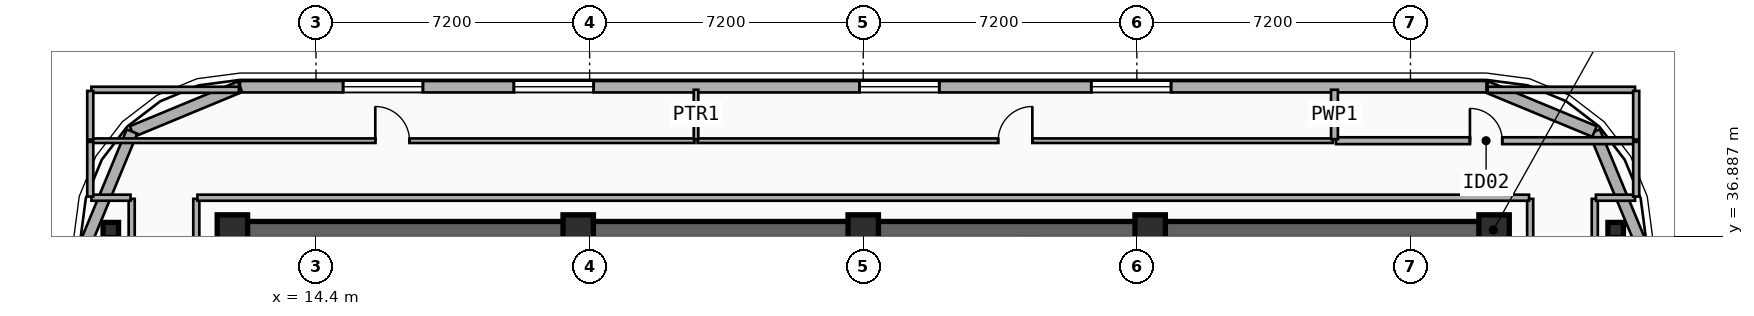
"""IFC4 building model, lengths in metres.
Left out: names, types, materials, properties, quantities, classifications, styles, units other than length and angle.
Written with IfcOpenShell. Run it as: python <this file> out.ifc"""

import sys

from ifc_helpers import new_model, si_unit, direction, frame, frame_2d, origin, origin_2d, place, context, subcontext, project, spatial, rectangle, i_section, extrude, element, fill, save


model = new_model("IFC4")
c1 = context("Model", 3, precision=1e-05, world=origin(), true_north=direction((0.0, 1.0)))
c2 = subcontext(c1, "Body", "Model", "MODEL_VIEW")
j1 = project(units=[si_unit("LENGTHUNIT", "METRE"), si_unit("PLANEANGLEUNIT", "RADIAN")], contexts=[c1])
p1 = place(None, origin())
s1 = spatial("IfcSite", under=j1, at=p1, CompositionType="ELEMENT")
p2 = place(p1, origin())
s2 = spatial("IfcBuilding", under=s1, at=p2, CompositionType="ELEMENT")
p3 = place(p2, frame((0.0, 0.0, 265.8)))
s3 = spatial("IfcBuildingStorey", under=s2, at=p3, CompositionType="ELEMENT", Elevation=265.8)
p4 = place(p3, frame((12.15, 37.05, 0.0), z_axis=(0.0, 0.0, 1.0), x_axis=(1.0, 0.0, 0.0)))
e1 = element("IfcWall", 1, at=p4, inside=s3, PredefinedType="SHEAR", context=c2, shape_type="SweptSolid", body=[
    extrude(rectangle(XDim=33.23, YDim=0.45, at=frame_2d((16.615, 0.0))), origin(), (0.0, 0.0, 1.0), 3.7),
])
for number, where, z_axis, x_axis in (
    (2, (12.2, 37.05, 0.0), (0.0, 0.0, 1.0), (1.0, 0.0, 0.0)),
    (3, (21.3, 37.05, 0.0), (0.0, 0.0, 1.0), (1.0, 0.0, 0.0)),
    (4, (28.8, 37.05, 0.0), (0.0, 0.0, 1.0), (1.0, 0.0, 0.0)),
    (5, (36.35, 37.05, 0.0), (0.0, 0.0, 1.0), (1.0, 0.0, 0.0)),
    (6, (45.4, 37.05, 0.0), (0.0, 0.0, 1.0), (1.0, 0.0, 0.0)),
):
    element("IfcColumn", number, at=place(p3, frame(where, z_axis=z_axis, x_axis=x_axis)), inside=s3, PredefinedType="COLUMN", context=c2, shape_type="SweptSolid", body=[
        extrude(rectangle(XDim=0.8, YDim=0.8, at=origin_2d()), origin(), (0.0, 0.0, 1.0), 3.7),
    ])
for number, where, z_axis, x_axis in (
    (7, (9.0, 37.05, 0.0), (0.0, 0.0, 1.0), (1.0, 0.0, 0.0)),
    (8, (48.6, 37.05, 0.0), (0.0, 0.0, 1.0), (1.0, 0.0, 0.0)),
):
    element("IfcColumn", number, at=place(p3, frame(where, z_axis=z_axis, x_axis=x_axis)), inside=s3, PredefinedType="COLUMN", context=c2, shape_type="SweptSolid", body=[
        extrude(i_section(OverallWidth=0.408, OverallDepth=0.4, WebThickness=0.025, FlangeThickness=0.039, FilletRadius=0.015, at=origin_2d()), origin(), (0.0, 0.0, 1.0), 3.7),
    ])
for number, where, z_axis, x_axis in (
    (9, (48.042, 39.643, 0.0), (0.0, 0.0, 1.0), (0.383, -0.924, 0.0)),
    (10, (45.2, 40.82, 0.0), (0.0, 0.0, 1.0), (0.924, -0.383, 0.0)),
):
    element("IfcWall", number, at=place(p3, frame(where, z_axis=z_axis, x_axis=x_axis)), inside=s3, PredefinedType="SOLIDWALL", context=c2, shape_type="SweptSolid", body=[
        extrude(rectangle(XDim=3.077, YDim=0.3, at=frame_2d((1.538, 0.0))), origin(), (0.0, 0.0, 1.0), 3.42),
    ])
p5 = place(p3, frame((12.4, 40.82, 0.0), z_axis=(0.0, 0.0, 1.0), x_axis=(1.0, 0.0, 0.0)))
e11 = element("IfcWall", 11, at=p5, inside=s3, PredefinedType="SOLIDWALL", context=c2, shape_type="SweptSolid", body=[
    extrude(rectangle(XDim=32.8, YDim=0.3, at=frame_2d((16.4, 0.0))), origin(), (0.0, 0.0, 1.0), 3.42),
])
p6 = place(p5, frame((2.713, 0.0, 0.75)))
e12 = element("IfcOpeningElement", 12, at=p6, cuts=e11, PredefinedType="OPENING", context=c2, shape_type="SweptSolid", body=[
    extrude(rectangle(XDim=2.1, YDim=2.1, at=frame_2d((1.05, 1.05))), frame((0.0, 0.16, 0.0), z_axis=(0.0, -1.0, 0.0), x_axis=(1.0, 0.0, 0.0)), (0.0, 0.0, 1.0), 0.32),
])
p7 = place(p5, frame((7.207, 0.0, 0.75)))
e13 = element("IfcOpeningElement", 13, at=p7, cuts=e11, PredefinedType="OPENING", context=c2, shape_type="SweptSolid", body=[
    extrude(rectangle(XDim=2.1, YDim=2.1, at=frame_2d((1.05, 1.05))), frame((0.0, 0.16, 0.0), z_axis=(0.0, -1.0, 0.0), x_axis=(1.0, 0.0, 0.0)), (0.0, 0.0, 1.0), 0.32),
])
p8 = place(p5, frame((16.3, 0.0, 0.75)))
e14 = element("IfcOpeningElement", 14, at=p8, cuts=e11, PredefinedType="OPENING", context=c2, shape_type="SweptSolid", body=[
    extrude(rectangle(XDim=2.1, YDim=2.1, at=frame_2d((1.05, 1.05))), frame((0.0, 0.16, 0.0), z_axis=(0.0, -1.0, 0.0), x_axis=(1.0, 0.0, 0.0)), (0.0, 0.0, 1.0), 0.32),
])
p9 = place(p5, frame((22.4, 0.0, 0.75)))
e15 = element("IfcOpeningElement", 15, at=p9, cuts=e11, PredefinedType="OPENING", context=c2, shape_type="SweptSolid", body=[
    extrude(rectangle(XDim=2.1, YDim=2.1, at=frame_2d((1.05, 1.05))), frame((0.0, 0.16, 0.0), z_axis=(0.0, -1.0, 0.0), x_axis=(1.0, 0.0, 0.0)), (0.0, 0.0, 1.0), 0.32),
])
for number, where, z_axis, x_axis in (
    (16, (9.557, 39.643, 0.0), (0.0, 0.0, 1.0), (0.924, 0.383, 0.0)),
    (17, (8.38, 36.8, 0.0), (0.0, 0.0, 1.0), (0.383, 0.924, 0.0)),
):
    element("IfcWall", number, at=place(p3, frame(where, z_axis=z_axis, x_axis=x_axis)), inside=s3, PredefinedType="SOLIDWALL", context=c2, shape_type="SweptSolid", body=[
        extrude(rectangle(XDim=3.077, YDim=0.3, at=frame_2d((1.538, 0.0))), origin(), (0.0, 0.0, 1.0), 3.42),
    ])
p10 = place(p3, frame((8.46, 39.4, 0.0), z_axis=(0.0, 0.0, 1.0), x_axis=(1.0, 0.0, 0.0)))
e18 = element("IfcWall", 18, at=p10, inside=s3, PredefinedType="PARTITIONING", context=c2, shape_type="SweptSolid", body=[
    extrude(rectangle(XDim=15.9, YDim=0.12, at=frame_2d((7.95, 0.0))), origin(), (0.0, 0.0, 1.0), 3.42),
])
p11 = place(p10, frame((7.5, 0.0, 0.0)))
e19 = element("IfcOpeningElement", 19, at=p11, cuts=e18, PredefinedType="OPENING", context=c2, shape_type="SweptSolid", body=[
    extrude(rectangle(XDim=0.9, YDim=2.1, at=frame_2d((0.45, 1.05))), frame((0.0, 0.07, 0.0), z_axis=(0.0, -1.0, 0.0), x_axis=(1.0, 0.0, 0.0)), (0.0, 0.0, 1.0), 0.14),
])
p12 = place(p3, frame((24.44, 39.4, 0.0), z_axis=(0.0, 0.0, 1.0), x_axis=(1.0, 0.0, 0.0)))
e20 = element("IfcWall", 20, at=p12, inside=s3, PredefinedType="PARTITIONING", context=c2, shape_type="SweptSolid", body=[
    extrude(rectangle(XDim=16.72, YDim=0.12, at=frame_2d((8.36, 0.0))), origin(), (0.0, 0.0, 1.0), 3.42),
])
p13 = place(p12, frame((7.91, 0.0, 0.0)))
e21 = element("IfcOpeningElement", 21, at=p13, cuts=e20, PredefinedType="OPENING", context=c2, shape_type="SweptSolid", body=[
    extrude(rectangle(XDim=0.9, YDim=2.1, at=frame_2d((0.45, 1.05))), frame((0.0, 0.07, 0.0), z_axis=(0.0, -1.0, 0.0), x_axis=(1.0, 0.0, 0.0)), (0.0, 0.0, 1.0), 0.14),
])
p14 = place(p3, frame((41.24, 39.4, 0.0), z_axis=(0.0, 0.0, 1.0), x_axis=(1.0, 0.0, 0.0)))
e22 = element("IfcWall", 22, at=p14, inside=s3, PredefinedType="PLUMBINGWALL", context=c2, shape_type="SweptSolid", body=[
    extrude(rectangle(XDim=7.9, YDim=0.18, at=frame_2d((3.95, 0.0))), origin(), (0.0, 0.0, 1.0), 3.42),
])
p15 = place(p14, frame((3.525, 0.0, 0.0)))
e23 = element("IfcOpeningElement", 23, at=p15, cuts=e22, PredefinedType="OPENING", context=c2, shape_type="SweptSolid", body=[
    extrude(rectangle(XDim=0.85, YDim=2.1, at=frame_2d((0.425, 1.05))), frame((0.0, 0.1, 0.0), z_axis=(0.0, -1.0, 0.0), x_axis=(1.0, 0.0, 0.0)), (0.0, 0.0, 1.0), 0.2),
])
p16 = place(p3, frame((24.4, 39.44, 0.0), z_axis=(0.0, 0.0, 1.0), x_axis=(0.0, 1.0, 0.0)))
e24 = element("IfcWall", 24, at=p16, inside=s3, PredefinedType="PARTITIONING", context=c2, shape_type="SweptSolid", body=[
    extrude(rectangle(XDim=1.3, YDim=0.12, at=frame_2d((0.65, 0.0))), origin(), (0.0, 0.0, 1.0), 3.42),
])
p17 = place(p3, frame((41.2, 39.44, 0.0), z_axis=(0.0, 0.0, 1.0), x_axis=(0.0, 1.0, 0.0)))
e25 = element("IfcWall", 25, at=p17, inside=s3, PredefinedType="PLUMBINGWALL", context=c2, shape_type="SweptSolid", body=[
    extrude(rectangle(XDim=1.3, YDim=0.18, at=frame_2d((0.65, 0.0))), origin(), (0.0, 0.0, 1.0), 3.42),
])
for number, where, z_axis, x_axis in (
    (26, (9.55, 27.63, 0.0), (0.0, 0.0, 1.0), (0.0, 1.0, 0.0)),
    (27, (11.25, 27.63, 0.0), (0.0, 0.0, 1.0), (0.0, 1.0, 0.0)),
    (28, (46.35, 27.63, 0.0), (0.0, 0.0, 1.0), (0.0, 1.0, 0.0)),
    (29, (48.05, 27.63, 0.0), (0.0, 0.0, 1.0), (0.0, 1.0, 0.0)),
):
    element("IfcWall", number, at=place(p3, frame(where, z_axis=z_axis, x_axis=x_axis)), inside=s3, PredefinedType="PARTITIONING", context=c2, shape_type="SweptSolid", body=[
        extrude(rectangle(XDim=10.24, YDim=0.16, at=frame_2d((5.12, 0.0))), origin(), (0.0, 0.0, 1.0), 2.9),
    ])
p18 = place(p3, frame((8.49, 37.9, 0.0), z_axis=(0.0, 0.0, 1.0), x_axis=(1.0, 0.0, 0.0)))
e30 = element("IfcWall", 30, at=p18, inside=s3, PredefinedType="PARTITIONING", context=c2, shape_type="SweptSolid", body=[
    extrude(rectangle(XDim=1.03, YDim=0.16, at=frame_2d((0.515, 0.0))), origin(), (0.0, 0.0, 1.0), 3.42),
])
p19 = place(p3, frame((11.28, 37.9, 0.0), z_axis=(0.0, 0.0, 1.0), x_axis=(1.0, 0.0, 0.0)))
e31 = element("IfcWall", 31, at=p19, inside=s3, PredefinedType="PARTITIONING", context=c2, shape_type="SweptSolid", body=[
    extrude(rectangle(XDim=35.04, YDim=0.16, at=frame_2d((17.52, 0.0))), origin(), (0.0, 0.0, 1.0), 3.42),
])
p20 = place(p3, frame((48.08, 37.9, 0.0), z_axis=(0.0, 0.0, 1.0), x_axis=(1.0, 0.0, 0.0)))
e32 = element("IfcWall", 32, at=p20, inside=s3, PredefinedType="PARTITIONING", context=c2, shape_type="SweptSolid", body=[
    extrude(rectangle(XDim=1.03, YDim=0.16, at=frame_2d((0.515, 0.0))), origin(), (0.0, 0.0, 1.0), 3.42),
])
for number, where, z_axis, x_axis in (
    (33, (8.46, 37.93, 0.0), (0.0, 0.0, 1.0), (0.0, 1.0, 0.0)),
    (34, (49.14, 37.93, 0.0), (0.0, 0.0, 1.0), (0.0, 1.0, 0.0)),
):
    element("IfcWall", number, at=place(p3, frame(where, z_axis=z_axis, x_axis=x_axis)), inside=s3, PredefinedType="PARTITIONING", context=c2, shape_type="SweptSolid", body=[
        extrude(rectangle(XDim=1.44, YDim=0.16, at=frame_2d((0.72, 0.0))), origin(), (0.0, 0.0, 1.0), 3.42),
    ])
p21 = place(p3, frame((8.49, 40.74, 0.0), z_axis=(0.0, 0.0, 1.0), x_axis=(1.0, 0.0, 0.0)))
e35 = element("IfcWall", 35, at=p21, inside=s3, PredefinedType="PARTITIONING", context=c2, shape_type="SweptSolid", body=[
    extrude(rectangle(XDim=3.88, YDim=0.16, at=frame_2d((1.94, 0.0))), origin(), (0.0, 0.0, 1.0), 3.42),
])
p22 = place(p3, frame((8.46, 39.43, 0.0), z_axis=(0.0, 0.0, 1.0), x_axis=(0.0, 1.0, 0.0)))
e36 = element("IfcWall", 36, at=p22, inside=s3, PredefinedType="PARTITIONING", context=c2, shape_type="SweptSolid", body=[
    extrude(rectangle(XDim=1.28, YDim=0.16, at=frame_2d((0.64, 0.0))), origin(), (0.0, 0.0, 1.0), 3.42),
])
p23 = place(p3, frame((45.23, 40.74, 0.0), z_axis=(0.0, 0.0, 1.0), x_axis=(1.0, 0.0, 0.0)))
e37 = element("IfcWall", 37, at=p23, inside=s3, PredefinedType="PARTITIONING", context=c2, shape_type="SweptSolid", body=[
    extrude(rectangle(XDim=3.88, YDim=0.16, at=frame_2d((1.94, 0.0))), origin(), (0.0, 0.0, 1.0), 3.42),
])
p24 = place(p3, frame((49.14, 39.43, 0.0), z_axis=(0.0, 0.0, 1.0), x_axis=(0.0, 1.0, 0.0)))
e38 = element("IfcWall", 38, at=p24, inside=s3, PredefinedType="PARTITIONING", context=c2, shape_type="SweptSolid", body=[
    extrude(rectangle(XDim=1.28, YDim=0.16, at=frame_2d((0.64, 0.0))), origin(), (0.0, 0.0, 1.0), 3.42),
])
p25 = place(p6, origin())
e39 = element("IfcWindow", 39, at=p25, inside=s3, PartitioningType="SINGLE_PANEL", PredefinedType="WINDOW", context=c2, shape_type="SweptSolid", body=[
    extrude(rectangle(XDim=2.1, YDim=2.1, at=frame_2d((1.05, 1.05))), frame((0.0, 0.03, 0.0), z_axis=(0.0, -1.0, 0.0), x_axis=(1.0, 0.0, 0.0)), (0.0, 0.0, 1.0), 0.06),
])
fill(e12, e39)
p26 = place(p7, origin())
e40 = element("IfcWindow", 40, at=p26, inside=s3, PartitioningType="SINGLE_PANEL", PredefinedType="WINDOW", context=c2, shape_type="SweptSolid", body=[
    extrude(rectangle(XDim=2.1, YDim=2.1, at=frame_2d((1.05, 1.05))), frame((0.0, 0.03, 0.0), z_axis=(0.0, -1.0, 0.0), x_axis=(1.0, 0.0, 0.0)), (0.0, 0.0, 1.0), 0.06),
])
fill(e13, e40)
p27 = place(p8, origin())
e41 = element("IfcWindow", 41, at=p27, inside=s3, PartitioningType="SINGLE_PANEL", PredefinedType="WINDOW", context=c2, shape_type="SweptSolid", body=[
    extrude(rectangle(XDim=2.1, YDim=2.1, at=frame_2d((1.05, 1.05))), frame((0.0, 0.03, 0.0), z_axis=(0.0, -1.0, 0.0), x_axis=(1.0, 0.0, 0.0)), (0.0, 0.0, 1.0), 0.06),
])
fill(e14, e41)
p28 = place(p9, origin())
e42 = element("IfcWindow", 42, at=p28, inside=s3, PartitioningType="SINGLE_PANEL", PredefinedType="WINDOW", context=c2, shape_type="SweptSolid", body=[
    extrude(rectangle(XDim=2.1, YDim=2.1, at=frame_2d((1.05, 1.05))), frame((0.0, 0.03, 0.0), z_axis=(0.0, -1.0, 0.0), x_axis=(1.0, 0.0, 0.0)), (0.0, 0.0, 1.0), 0.06),
])
fill(e15, e42)
p29 = place(p11, origin())
e43 = element("IfcDoor", 43, at=p29, inside=s3, OperationType="SINGLE_SWING_LEFT", PredefinedType="DOOR", context=c2, shape_type="SweptSolid", body=[
    extrude(rectangle(XDim=0.9, YDim=2.1, at=frame_2d((0.45, 1.05))), frame((0.0, 0.025, 0.0), z_axis=(0.0, -1.0, 0.0), x_axis=(1.0, 0.0, 0.0)), (0.0, 0.0, 1.0), 0.05),
])
fill(e19, e43)
p30 = place(p13, origin())
e44 = element("IfcDoor", 44, at=p30, inside=s3, OperationType="SINGLE_SWING_RIGHT", PredefinedType="DOOR", context=c2, shape_type="SweptSolid", body=[
    extrude(rectangle(XDim=0.9, YDim=2.1, at=frame_2d((0.45, 1.05))), frame((0.0, 0.025, 0.0), z_axis=(0.0, -1.0, 0.0), x_axis=(1.0, 0.0, 0.0)), (0.0, 0.0, 1.0), 0.05),
])
fill(e21, e44)
p31 = place(p15, origin())
e45 = element("IfcDoor", 45, at=p31, inside=s3, OperationType="SINGLE_SWING_LEFT", PredefinedType="DOOR", context=c2, shape_type="SweptSolid", body=[
    extrude(rectangle(XDim=0.85, YDim=2.1, at=frame_2d((0.425, 1.05))), frame((0.0, 0.025, 0.0), z_axis=(0.0, -1.0, 0.0), x_axis=(1.0, 0.0, 0.0)), (0.0, 0.0, 1.0), 0.05),
])
fill(e23, e45)
save(model, sys.argv[1])
